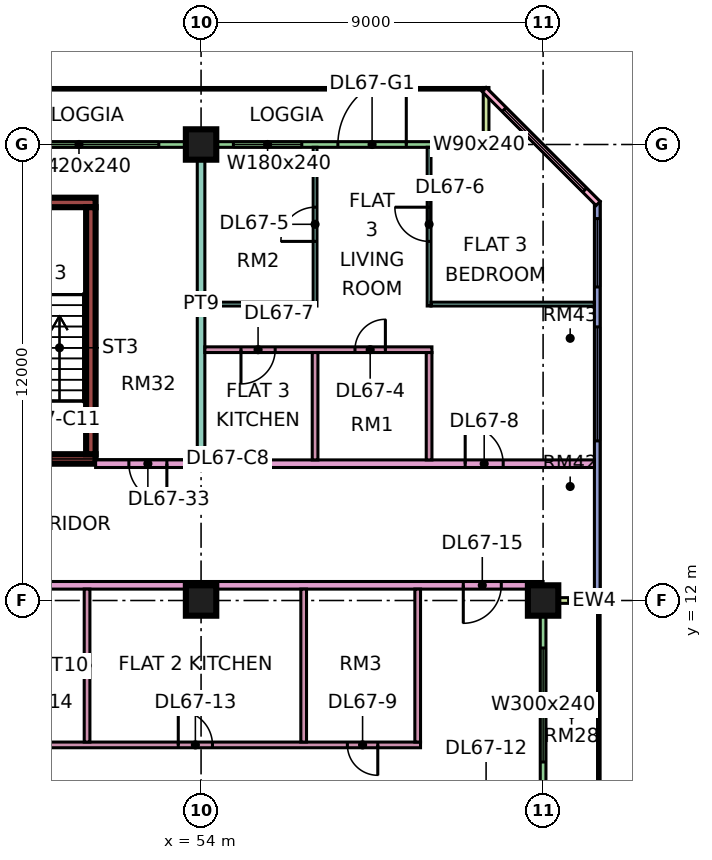
"""IFC4 building model, lengths in metres.
Left out: names, types, materials, properties, quantities, classifications, styles, units other than length and angle.
Written with IfcOpenShell. Run it as: python <this file> out.ifc"""

import sys

from ifc_helpers import new_model, si_unit, direction, frame, frame_2d, origin, origin_2d, place, context, subcontext, project, spatial, rectangle, extrude, element, fill, save


model = new_model("IFC4")
c1 = context("Model", 3, precision=1e-05, world=origin(), true_north=direction((0.0, 1.0)))
c2 = subcontext(c1, "Body", "Model", "MODEL_VIEW")
j1 = project(units=[si_unit("LENGTHUNIT", "METRE"), si_unit("PLANEANGLEUNIT", "RADIAN")], contexts=[c1])
p1 = place(None, origin())
s1 = spatial("IfcSite", under=j1, at=p1, CompositionType="ELEMENT")
p2 = place(p1, origin())
s2 = spatial("IfcBuilding", under=s1, at=p2, CompositionType="ELEMENT")
p3 = place(p2, frame((0.0, 0.0, 288.4)))
s3 = spatial("IfcBuildingStorey", under=s2, at=p3, CompositionType="ELEMENT", Elevation=288.4)
for number, where, z_axis, x_axis in (
    (1, (54.0, 12.0, 0.0), (0.0, 0.0, 1.0), (1.0, 0.0, 0.0)),
    (2, (54.0, 24.0, 0.0), (0.0, 0.0, 1.0), (1.0, 0.0, 0.0)),
    (3, (63.0, 12.0, 0.0), (0.0, 0.0, 1.0), (1.0, 0.0, 0.0)),
):
    element("IfcColumn", number, at=place(p3, frame(where, z_axis=z_axis, x_axis=x_axis)), inside=s3, PredefinedType="COLUMN", context=c2, shape_type="SweptSolid", body=[
        extrude(rectangle(XDim=0.8, YDim=0.8, at=origin_2d()), origin(), (0.0, 0.0, 1.0), 3.75),
    ])
p4 = place(p3, frame((47.775, 15.725, 0.0), z_axis=(0.0, 0.0, 1.0), x_axis=(1.0, 0.0, 0.0)))
e4 = element("IfcWall", 4, at=p4, inside=s3, PredefinedType="SHEAR", context=c2, shape_type="SweptSolid", body=[
    extrude(rectangle(XDim=3.45, YDim=0.25, at=frame_2d((1.725, 0.0))), origin(), (0.0, 0.0, 1.0), 3.75),
])
p5 = place(p4, frame((1.175, 0.0, 0.0)))
e5 = element("IfcOpeningElement", 5, at=p5, cuts=e4, PredefinedType="OPENING", context=c2, shape_type="SweptSolid", body=[
    extrude(rectangle(XDim=1.1, YDim=2.2, at=frame_2d((0.55, 1.1))), frame((0.0, 0.135, 0.0), z_axis=(0.0, -1.0, 0.0), x_axis=(1.0, 0.0, 0.0)), (0.0, 0.0, 1.0), 0.27),
])
p6 = place(p3, frame((47.775, 22.475, 0.0), z_axis=(0.0, 0.0, 1.0), x_axis=(1.0, 0.0, 0.0)))
e6 = element("IfcWall", 6, at=p6, inside=s3, PredefinedType="SHEAR", context=c2, shape_type="SweptSolid", body=[
    extrude(rectangle(XDim=3.45, YDim=0.25, at=frame_2d((1.725, 0.0))), origin(), (0.0, 0.0, 1.0), 3.75),
])
p7 = place(p3, frame((51.1, 15.85, 0.0), z_axis=(0.0, 0.0, 1.0), x_axis=(0.0, 1.0, 0.0)))
e7 = element("IfcWall", 7, at=p7, inside=s3, PredefinedType="SHEAR", context=c2, shape_type="SweptSolid", body=[
    extrude(rectangle(XDim=6.5, YDim=0.25, at=frame_2d((3.25, 0.0))), origin(), (0.0, 0.0, 1.0), 3.75),
])
p8 = place(p3, frame((61.425, 24.0, 0.0), z_axis=(0.0, 0.0, 1.0), x_axis=(-1.0, 0.0, 0.0)))
e8 = element("IfcWall", 8, at=p8, inside=s3, PredefinedType="SOLIDWALL", context=c2, shape_type="SweptSolid", body=[
    extrude(rectangle(XDim=13.35, YDim=0.15, at=frame_2d((6.675, 0.0))), origin(), (0.0, 0.0, 1.0), 3.35),
])
p9 = place(p8, frame((0.262, 0.0, 0.45)))
e9 = element("IfcOpeningElement", 9, at=p9, cuts=e8, PredefinedType="OPENING", context=c2, shape_type="SweptSolid", body=[
    extrude(rectangle(XDim=0.9, YDim=2.4, at=frame_2d((0.45, 1.2))), frame((0.0, 0.085, 0.0), z_axis=(0.0, -1.0, 0.0), x_axis=(1.0, 0.0, 0.0)), (0.0, 0.0, 1.0), 0.17),
])
p10 = place(p8, frame((2.025, 0.0, 0.0)))
e10 = element("IfcOpeningElement", 10, at=p10, cuts=e8, PredefinedType="OPENING", context=c2, shape_type="SweptSolid", body=[
    extrude(rectangle(XDim=1.8, YDim=2.4, at=frame_2d((0.9, 1.2))), frame((0.0, 0.085, 0.0), z_axis=(0.0, -1.0, 0.0), x_axis=(1.0, 0.0, 0.0)), (0.0, 0.0, 1.0), 0.17),
])
p11 = place(p8, frame((4.775, 0.0, 0.45)))
e11 = element("IfcOpeningElement", 11, at=p11, cuts=e8, PredefinedType="OPENING", context=c2, shape_type="SweptSolid", body=[
    extrude(rectangle(XDim=1.8, YDim=2.4, at=frame_2d((0.9, 1.2))), frame((0.0, 0.085, 0.0), z_axis=(0.0, -1.0, 0.0), x_axis=(1.0, 0.0, 0.0)), (0.0, 0.0, 1.0), 0.17),
])
p12 = place(p8, frame((8.538, 0.0, 0.45)))
e12 = element("IfcOpeningElement", 12, at=p12, cuts=e8, PredefinedType="OPENING", context=c2, shape_type="SweptSolid", body=[
    extrude(rectangle(XDim=4.2, YDim=2.4, at=frame_2d((2.1, 1.2))), frame((0.0, 0.085, 0.0), z_axis=(0.0, -1.0, 0.0), x_axis=(1.0, 0.0, 0.0)), (0.0, 0.0, 1.0), 0.17),
])
p13 = place(p3, frame((61.5, 25.5, 0.0), z_axis=(0.0, 0.0, 1.0), x_axis=(0.0, -1.0, 0.0)))
e13 = element("IfcWall", 13, at=p13, inside=s3, PredefinedType="SOLIDWALL", context=c2, shape_type="SweptSolid", body=[
    extrude(rectangle(XDim=1.5, YDim=0.15, at=frame_2d((0.75, 0.0))), origin(), (0.0, 0.0, 1.0), 3.35),
])
p14 = place(p3, frame((63.0, 1.575, 0.0), z_axis=(0.0, 0.0, 1.0), x_axis=(0.0, 1.0, 0.0)))
e14 = element("IfcWall", 14, at=p14, inside=s3, PredefinedType="SOLIDWALL", context=c2, shape_type="SweptSolid", body=[
    extrude(rectangle(XDim=10.35, YDim=0.15, at=frame_2d((5.175, 0.0))), origin(), (0.0, 0.0, 1.0), 3.35),
])
p15 = place(p14, frame((1.812, 0.0, 0.0)))
e15 = element("IfcOpeningElement", 15, at=p15, cuts=e14, PredefinedType="OPENING", context=c2, shape_type="SweptSolid", body=[
    extrude(rectangle(XDim=1.8, YDim=2.4, at=frame_2d((0.9, 1.2))), frame((0.0, 0.085, 0.0), z_axis=(0.0, -1.0, 0.0), x_axis=(1.0, 0.0, 0.0)), (0.0, 0.0, 1.0), 0.17),
])
p16 = place(p14, frame((6.175, 0.0, 0.45)))
e16 = element("IfcOpeningElement", 16, at=p16, cuts=e14, PredefinedType="OPENING", context=c2, shape_type="SweptSolid", body=[
    extrude(rectangle(XDim=3.0, YDim=2.4, at=frame_2d((1.5, 1.2))), frame((0.0, 0.085, 0.0), z_axis=(0.0, -1.0, 0.0), x_axis=(1.0, 0.0, 0.0)), (0.0, 0.0, 1.0), 0.17),
])
p17 = place(p3, frame((64.5, 12.0, 0.0), z_axis=(0.0, 0.0, 1.0), x_axis=(-1.0, 0.0, 0.0)))
e17 = element("IfcWall", 17, at=p17, inside=s3, PredefinedType="SOLIDWALL", context=c2, shape_type="SweptSolid", body=[
    extrude(rectangle(XDim=1.5, YDim=0.15, at=frame_2d((0.75, 0.0))), origin(), (0.0, 0.0, 1.0), 3.35),
])
p18 = place(p3, frame((64.425, 12.075, 0.0), z_axis=(0.0, 0.0, 1.0), x_axis=(0.0, 1.0, 0.0)))
e18 = element("IfcWall", 18, at=p18, inside=s3, PredefinedType="SOLIDWALL", context=c2, shape_type="SweptSolid", body=[
    extrude(rectangle(XDim=10.425, YDim=0.15, at=frame_2d((5.212, 0.0))), origin(), (0.0, 0.0, 1.0), 3.35),
])
p19 = place(p18, frame((4.125, 0.0, 0.45)))
e19 = element("IfcOpeningElement", 19, at=p19, cuts=e18, PredefinedType="OPENING", context=c2, shape_type="SweptSolid", body=[
    extrude(rectangle(XDim=3.0, YDim=2.4, at=frame_2d((1.5, 1.2))), frame((0.0, 0.085, 0.0), z_axis=(0.0, -1.0, 0.0), x_axis=(1.0, 0.0, 0.0)), (0.0, 0.0, 1.0), 0.17),
])
p20 = place(p18, frame((8.175, 0.0, 0.45)))
e20 = element("IfcOpeningElement", 20, at=p20, cuts=e18, PredefinedType="OPENING", context=c2, shape_type="SweptSolid", body=[
    extrude(rectangle(XDim=1.8, YDim=2.4, at=frame_2d((0.9, 1.2))), frame((0.0, 0.085, 0.0), z_axis=(0.0, -1.0, 0.0), x_axis=(1.0, 0.0, 0.0)), (0.0, 0.0, 1.0), 0.17),
])
p21 = place(p3, frame((64.447, 22.447, 0.0), z_axis=(0.0, 0.0, 1.0), x_axis=(-0.707106781187, 0.707106781187, 0.0)))
e21 = element("IfcWall", 21, at=p21, inside=s3, PredefinedType="SOLIDWALL", context=c2, shape_type="SweptSolid", body=[
    extrude(rectangle(XDim=4.243, YDim=0.15, at=frame_2d((2.121, 0.0))), origin(), (0.0, 0.0, 1.0), 3.35),
])
p22 = place(p21, frame((0.498, 0.0, 0.45)))
e22 = element("IfcOpeningElement", 22, at=p22, cuts=e21, PredefinedType="OPENING", context=c2, shape_type="SweptSolid", body=[
    extrude(rectangle(XDim=3.0, YDim=2.4, at=frame_2d((1.5, 1.2))), frame((0.0, 0.085, 0.0), z_axis=(0.0, -1.0, 0.0), x_axis=(1.0, 0.0, 0.0)), (0.0, 0.0, 1.0), 0.17),
])
p23 = place(p3, frame((40.65, 12.4, 0.0), z_axis=(0.0, 0.0, 1.0), x_axis=(1.0, 0.0, 0.0)))
e23 = element("IfcWall", 23, at=p23, inside=s3, PredefinedType="PARTITIONING", context=c2, shape_type="SweptSolid", body=[
    extrude(rectangle(XDim=22.35, YDim=0.2, at=frame_2d((11.175, 0.0))), origin(), (0.0, 0.0, 1.0), 3.35),
])
p24 = place(p23, frame((20.25, 0.0, 0.0)))
e24 = element("IfcOpeningElement", 24, at=p24, cuts=e23, PredefinedType="OPENING", context=c2, shape_type="SweptSolid", body=[
    extrude(rectangle(XDim=1.0, YDim=2.1, at=frame_2d((0.5, 1.05))), frame((0.0, 0.11, 0.0), z_axis=(0.0, -1.0, 0.0), x_axis=(1.0, 0.0, 0.0)), (0.0, 0.0, 1.0), 0.22),
])
p25 = place(p23, frame((1.05, 0.0, 0.0)))
e25 = element("IfcOpeningElement", 25, at=p25, cuts=e23, PredefinedType="OPENING", context=c2, shape_type="SweptSolid", body=[
    extrude(rectangle(XDim=1.0, YDim=2.1, at=frame_2d((0.5, 1.05))), frame((0.0, 0.11, 0.0), z_axis=(0.0, -1.0, 0.0), x_axis=(1.0, 0.0, 0.0)), (0.0, 0.0, 1.0), 0.22),
])
p26 = place(p3, frame((48.1, 8.2, 0.0), z_axis=(0.0, 0.0, 1.0), x_axis=(1.0, 0.0, 0.0)))
e26 = element("IfcWall", 26, at=p26, inside=s3, PredefinedType="PARTITIONING", context=c2, shape_type="SweptSolid", body=[
    extrude(rectangle(XDim=11.675, YDim=0.15, at=frame_2d((5.837, 0.0))), origin(), (0.0, 0.0, 1.0), 3.35),
])
p27 = place(p26, frame((9.75, 0.0, 0.0)))
e27 = element("IfcOpeningElement", 27, at=p27, cuts=e26, PredefinedType="OPENING", context=c2, shape_type="SweptSolid", body=[
    extrude(rectangle(XDim=0.8, YDim=2.1, at=frame_2d((0.4, 1.05))), frame((0.0, 0.085, 0.0), z_axis=(0.0, -1.0, 0.0), x_axis=(1.0, 0.0, 0.0)), (0.0, 0.0, 1.0), 0.17),
])
p28 = place(p26, frame((5.3, 0.0, 0.0)))
e28 = element("IfcOpeningElement", 28, at=p28, cuts=e26, PredefinedType="OPENING", context=c2, shape_type="SweptSolid", body=[
    extrude(rectangle(XDim=0.9, YDim=2.1, at=frame_2d((0.45, 1.05))), frame((0.0, 0.085, 0.0), z_axis=(0.0, -1.0, 0.0), x_axis=(1.0, 0.0, 0.0)), (0.0, 0.0, 1.0), 0.17),
])
p29 = place(p26, frame((1.05, 0.0, 0.0)))
e29 = element("IfcOpeningElement", 29, at=p29, cuts=e26, PredefinedType="OPENING", context=c2, shape_type="SweptSolid", body=[
    extrude(rectangle(XDim=0.8, YDim=2.1, at=frame_2d((0.4, 1.05))), frame((0.0, 0.085, 0.0), z_axis=(0.0, -1.0, 0.0), x_axis=(1.0, 0.0, 0.0)), (0.0, 0.0, 1.0), 0.17),
])
p30 = place(p3, frame((51.0, 8.275, 0.0), z_axis=(0.0, 0.0, 1.0), x_axis=(0.0, 1.0, 0.0)))
e30 = element("IfcWall", 30, at=p30, inside=s3, PredefinedType="PARTITIONING", context=c2, shape_type="SweptSolid", body=[
    extrude(rectangle(XDim=4.025, YDim=0.15, at=frame_2d((2.013, 0.0))), origin(), (0.0, 0.0, 1.0), 3.35),
])
p31 = place(p3, frame((51.225, 15.6, 0.0), z_axis=(0.0, 0.0, 1.0), x_axis=(1.0, 0.0, 0.0)))
e31 = element("IfcWall", 31, at=p31, inside=s3, PredefinedType="PARTITIONING", context=c2, shape_type="SweptSolid", body=[
    extrude(rectangle(XDim=13.125, YDim=0.2, at=frame_2d((6.562, 0.0))), origin(), (0.0, 0.0, 1.0), 3.35),
])
p32 = place(p31, frame((9.725, 0.0, 0.0)))
e32 = element("IfcOpeningElement", 32, at=p32, cuts=e31, PredefinedType="OPENING", context=c2, shape_type="SweptSolid", body=[
    extrude(rectangle(XDim=1.0, YDim=2.1, at=frame_2d((0.5, 1.05))), frame((0.0, 0.11, 0.0), z_axis=(0.0, -1.0, 0.0), x_axis=(1.0, 0.0, 0.0)), (0.0, 0.0, 1.0), 0.22),
])
p33 = place(p31, frame((0.875, 0.0, 0.0)))
e33 = element("IfcOpeningElement", 33, at=p33, cuts=e31, PredefinedType="OPENING", context=c2, shape_type="SweptSolid", body=[
    extrude(rectangle(XDim=1.0, YDim=2.1, at=frame_2d((0.5, 1.05))), frame((0.0, 0.11, 0.0), z_axis=(0.0, -1.0, 0.0), x_axis=(1.0, 0.0, 0.0)), (0.0, 0.0, 1.0), 0.22),
])
p34 = place(p3, frame((54.0, 15.7, 0.0), z_axis=(0.0, 0.0, 1.0), x_axis=(0.0, 1.0, 0.0)))
e34 = element("IfcWall", 34, at=p34, inside=s3, PredefinedType="PARTITIONING", context=c2, shape_type="SweptSolid", body=[
    extrude(rectangle(XDim=8.226, YDim=0.2, at=frame_2d((4.113, 0.0))), origin(), (0.0, 0.0, 1.0), 3.35),
])
p35 = place(p3, frame((54.1, 18.6, 0.0), z_axis=(0.0, 0.0, 1.0), x_axis=(1.0, 0.0, 0.0)))
e35 = element("IfcWall", 35, at=p35, inside=s3, PredefinedType="PARTITIONING", context=c2, shape_type="SweptSolid", body=[
    extrude(rectangle(XDim=5.975, YDim=0.15, at=frame_2d((2.987, 0.0))), origin(), (0.0, 0.0, 1.0), 3.35),
])
p36 = place(p35, frame((3.95, 0.0, 0.0)))
e36 = element("IfcOpeningElement", 36, at=p36, cuts=e35, PredefinedType="OPENING", context=c2, shape_type="SweptSolid", body=[
    extrude(rectangle(XDim=0.8, YDim=2.1, at=frame_2d((0.4, 1.05))), frame((0.0, 0.085, 0.0), z_axis=(0.0, -1.0, 0.0), x_axis=(1.0, 0.0, 0.0)), (0.0, 0.0, 1.0), 0.17),
])
p37 = place(p35, frame((0.95, 0.0, 0.0)))
e37 = element("IfcOpeningElement", 37, at=p37, cuts=e35, PredefinedType="OPENING", context=c2, shape_type="SweptSolid", body=[
    extrude(rectangle(XDim=0.9, YDim=2.1, at=frame_2d((0.45, 1.05))), frame((0.0, 0.085, 0.0), z_axis=(0.0, -1.0, 0.0), x_axis=(1.0, 0.0, 0.0)), (0.0, 0.0, 1.0), 0.17),
])
p38 = place(p3, frame((54.1, 19.8, 0.0), z_axis=(0.0, 0.0, 1.0), x_axis=(1.0, 0.0, 0.0)))
e38 = element("IfcWall", 38, at=p38, inside=s3, PredefinedType="PARTITIONING", context=c2, shape_type="SweptSolid", body=[
    extrude(rectangle(XDim=2.85, YDim=0.1, at=frame_2d((1.425, 0.0))), origin(), (0.0, 0.0, 1.0), 3.35),
])
p39 = place(p3, frame((56.7, 8.275, 0.0), z_axis=(0.0, 0.0, 1.0), x_axis=(0.0, 1.0, 0.0)))
e39 = element("IfcWall", 39, at=p39, inside=s3, PredefinedType="PARTITIONING", context=c2, shape_type="SweptSolid", body=[
    extrude(rectangle(XDim=4.025, YDim=0.15, at=frame_2d((2.013, 0.0))), origin(), (0.0, 0.0, 1.0), 3.35),
])
p40 = place(p3, frame((57.0, 15.7, 0.0), z_axis=(0.0, 0.0, 1.0), x_axis=(0.0, 1.0, 0.0)))
e40 = element("IfcWall", 40, at=p40, inside=s3, PredefinedType="PARTITIONING", context=c2, shape_type="SweptSolid", body=[
    extrude(rectangle(XDim=2.825, YDim=0.15, at=frame_2d((1.413, 0.0))), origin(), (0.0, 0.0, 1.0), 3.35),
])
p41 = place(p3, frame((57.0, 19.75, 0.0), z_axis=(0.0, 0.0, 1.0), x_axis=(0.0, 1.0, 0.0)))
e41 = element("IfcWall", 41, at=p41, inside=s3, PredefinedType="PARTITIONING", context=c2, shape_type="SweptSolid", body=[
    extrude(rectangle(XDim=4.176, YDim=0.1, at=frame_2d((2.088, 0.0))), origin(), (0.0, 0.0, 1.0), 3.35),
])
p42 = place(p41, frame((1.7, 0.0, 0.0)))
e42 = element("IfcOpeningElement", 42, at=p42, cuts=e41, PredefinedType="OPENING", context=c2, shape_type="SweptSolid", body=[
    extrude(rectangle(XDim=0.9, YDim=2.1, at=frame_2d((0.45, 1.05))), frame((0.0, 0.06, 0.0), z_axis=(0.0, -1.0, 0.0), x_axis=(1.0, 0.0, 0.0)), (0.0, 0.0, 1.0), 0.12),
])
p43 = place(p3, frame((59.7, 8.275, 0.0), z_axis=(0.0, 0.0, 1.0), x_axis=(0.0, 1.0, 0.0)))
e43 = element("IfcWall", 43, at=p43, inside=s3, PredefinedType="PARTITIONING", context=c2, shape_type="SweptSolid", body=[
    extrude(rectangle(XDim=4.025, YDim=0.15, at=frame_2d((2.013, 0.0))), origin(), (0.0, 0.0, 1.0), 3.35),
])
p44 = place(p3, frame((60.0, 15.7, 0.0), z_axis=(0.0, 0.0, 1.0), x_axis=(0.0, 1.0, 0.0)))
e44 = element("IfcWall", 44, at=p44, inside=s3, PredefinedType="PARTITIONING", context=c2, shape_type="SweptSolid", body=[
    extrude(rectangle(XDim=2.825, YDim=0.15, at=frame_2d((1.413, 0.0))), origin(), (0.0, 0.0, 1.0), 3.35),
])
p45 = place(p3, frame((60.0, 19.75, 0.0), z_axis=(0.0, 0.0, 1.0), x_axis=(0.0, 1.0, 0.0)))
e45 = element("IfcWall", 45, at=p45, inside=s3, PredefinedType="PARTITIONING", context=c2, shape_type="SweptSolid", body=[
    extrude(rectangle(XDim=4.176, YDim=0.1, at=frame_2d((2.088, 0.0))), origin(), (0.0, 0.0, 1.0), 3.35),
])
p46 = place(p45, frame((1.7, 0.0, 0.0)))
e46 = element("IfcOpeningElement", 46, at=p46, cuts=e45, PredefinedType="OPENING", context=c2, shape_type="SweptSolid", body=[
    extrude(rectangle(XDim=0.9, YDim=2.1, at=frame_2d((0.45, 1.05))), frame((0.0, 0.06, 0.0), z_axis=(0.0, -1.0, 0.0), x_axis=(1.0, 0.0, 0.0)), (0.0, 0.0, 1.0), 0.12),
])
p47 = place(p3, frame((60.05, 19.8, 0.0), z_axis=(0.0, 0.0, 1.0), x_axis=(1.0, 0.0, 0.0)))
e47 = element("IfcWall", 47, at=p47, inside=s3, PredefinedType="PARTITIONING", context=c2, shape_type="SweptSolid", body=[
    extrude(rectangle(XDim=4.3, YDim=0.1, at=frame_2d((2.15, 0.0))), origin(), (0.0, 0.0, 1.0), 3.35),
])
p48 = place(p9, origin())
e48 = element("IfcWindow", 48, at=p48, inside=s3, PartitioningType="SINGLE_PANEL", PredefinedType="WINDOW", context=c2, shape_type="SweptSolid", body=[
    extrude(rectangle(XDim=0.9, YDim=2.4, at=frame_2d((0.45, 1.2))), frame((0.0, 0.03, 0.0), z_axis=(0.0, -1.0, 0.0), x_axis=(1.0, 0.0, 0.0)), (0.0, 0.0, 1.0), 0.06),
])
fill(e9, e48)
p49 = place(p10, frame((1.8, 0.0, 0.0), z_axis=(0.0, 0.0, 1.0), x_axis=(-1.0, 0.0, 0.0)))
e49 = element("IfcDoor", 49, at=p49, inside=s3, OperationType="DOUBLE_DOOR_SINGLE_SWING", PredefinedType="DOOR", context=c2, shape_type="SweptSolid", body=[
    extrude(rectangle(XDim=1.8, YDim=2.4, at=frame_2d((0.9, 1.2))), frame((0.0, 0.025, 0.0), z_axis=(0.0, -1.0, 0.0), x_axis=(1.0, 0.0, 0.0)), (0.0, 0.0, 1.0), 0.05),
])
fill(e10, e49)
p50 = place(p11, origin())
e50 = element("IfcWindow", 50, at=p50, inside=s3, PartitioningType="SINGLE_PANEL", PredefinedType="WINDOW", context=c2, shape_type="SweptSolid", body=[
    extrude(rectangle(XDim=1.8, YDim=2.4, at=frame_2d((0.9, 1.2))), frame((0.0, 0.03, 0.0), z_axis=(0.0, -1.0, 0.0), x_axis=(1.0, 0.0, 0.0)), (0.0, 0.0, 1.0), 0.06),
])
fill(e11, e50)
p51 = place(p12, origin())
e51 = element("IfcWindow", 51, at=p51, inside=s3, PartitioningType="SINGLE_PANEL", PredefinedType="WINDOW", context=c2, shape_type="SweptSolid", body=[
    extrude(rectangle(XDim=4.2, YDim=2.4, at=frame_2d((2.1, 1.2))), frame((0.0, 0.03, 0.0), z_axis=(0.0, -1.0, 0.0), x_axis=(1.0, 0.0, 0.0)), (0.0, 0.0, 1.0), 0.06),
])
fill(e12, e51)
p52 = place(p16, origin())
e52 = element("IfcWindow", 52, at=p52, inside=s3, PartitioningType="SINGLE_PANEL", PredefinedType="WINDOW", context=c2, shape_type="SweptSolid", body=[
    extrude(rectangle(XDim=3.0, YDim=2.4, at=frame_2d((1.5, 1.2))), frame((0.0, 0.03, 0.0), z_axis=(0.0, -1.0, 0.0), x_axis=(1.0, 0.0, 0.0)), (0.0, 0.0, 1.0), 0.06),
])
fill(e16, e52)
p53 = place(p19, origin())
e53 = element("IfcWindow", 53, at=p53, inside=s3, PartitioningType="SINGLE_PANEL", PredefinedType="WINDOW", context=c2, shape_type="SweptSolid", body=[
    extrude(rectangle(XDim=3.0, YDim=2.4, at=frame_2d((1.5, 1.2))), frame((0.0, 0.03, 0.0), z_axis=(0.0, -1.0, 0.0), x_axis=(1.0, 0.0, 0.0)), (0.0, 0.0, 1.0), 0.06),
])
fill(e19, e53)
p54 = place(p20, origin())
e54 = element("IfcWindow", 54, at=p54, inside=s3, PartitioningType="SINGLE_PANEL", PredefinedType="WINDOW", context=c2, shape_type="SweptSolid", body=[
    extrude(rectangle(XDim=1.8, YDim=2.4, at=frame_2d((0.9, 1.2))), frame((0.0, 0.03, 0.0), z_axis=(0.0, -1.0, 0.0), x_axis=(1.0, 0.0, 0.0)), (0.0, 0.0, 1.0), 0.06),
])
fill(e20, e54)
p55 = place(p22, origin())
e55 = element("IfcWindow", 55, at=p55, inside=s3, PartitioningType="SINGLE_PANEL", PredefinedType="WINDOW", context=c2, shape_type="SweptSolid", body=[
    extrude(rectangle(XDim=3.0, YDim=2.4, at=frame_2d((1.5, 1.2))), frame((0.0, 0.03, 0.0), z_axis=(0.0, -1.0, 0.0), x_axis=(1.0, 0.0, 0.0)), (0.0, 0.0, 1.0), 0.06),
])
fill(e22, e55)
p56 = place(p36, frame((0.8, 0.0, 0.0), z_axis=(0.0, 0.0, 1.0), x_axis=(-1.0, 0.0, 0.0)))
e56 = element("IfcDoor", 56, at=p56, inside=s3, OperationType="SINGLE_SWING_RIGHT", PredefinedType="DOOR", context=c2, shape_type="SweptSolid", body=[
    extrude(rectangle(XDim=0.8, YDim=2.1, at=frame_2d((0.4, 1.05))), frame((0.0, 0.025, 0.0), z_axis=(0.0, -1.0, 0.0), x_axis=(1.0, 0.0, 0.0)), (0.0, 0.0, 1.0), 0.05),
])
fill(e36, e56)
p57 = place(p42, origin())
e57 = element("IfcDoor", 57, at=p57, inside=s3, OperationType="SINGLE_SWING_LEFT", PredefinedType="DOOR", context=c2, shape_type="SweptSolid", body=[
    extrude(rectangle(XDim=0.9, YDim=2.1, at=frame_2d((0.45, 1.05))), frame((0.0, 0.025, 0.0), z_axis=(0.0, -1.0, 0.0), x_axis=(1.0, 0.0, 0.0)), (0.0, 0.0, 1.0), 0.05),
])
fill(e42, e57)
p58 = place(p46, frame((0.9, 0.0, 0.0), z_axis=(0.0, 0.0, 1.0), x_axis=(-1.0, 0.0, 0.0)))
e58 = element("IfcDoor", 58, at=p58, inside=s3, OperationType="SINGLE_SWING_RIGHT", PredefinedType="DOOR", context=c2, shape_type="SweptSolid", body=[
    extrude(rectangle(XDim=0.9, YDim=2.1, at=frame_2d((0.45, 1.05))), frame((0.0, 0.025, 0.0), z_axis=(0.0, -1.0, 0.0), x_axis=(1.0, 0.0, 0.0)), (0.0, 0.0, 1.0), 0.05),
])
fill(e46, e58)
p59 = place(p37, frame((0.9, 0.0, 0.0), z_axis=(0.0, 0.0, 1.0), x_axis=(-1.0, 0.0, 0.0)))
e59 = element("IfcDoor", 59, at=p59, inside=s3, OperationType="SINGLE_SWING_LEFT", PredefinedType="DOOR", context=c2, shape_type="SweptSolid", body=[
    extrude(rectangle(XDim=0.9, YDim=2.1, at=frame_2d((0.45, 1.05))), frame((0.0, 0.025, 0.0), z_axis=(0.0, -1.0, 0.0), x_axis=(1.0, 0.0, 0.0)), (0.0, 0.0, 1.0), 0.05),
])
fill(e37, e59)
p60 = place(p32, origin())
e60 = element("IfcDoor", 60, at=p60, inside=s3, OperationType="SINGLE_SWING_LEFT", PredefinedType="DOOR", context=c2, shape_type="SweptSolid", body=[
    extrude(rectangle(XDim=1.0, YDim=2.1, at=frame_2d((0.5, 1.05))), frame((0.0, 0.025, 0.0), z_axis=(0.0, -1.0, 0.0), x_axis=(1.0, 0.0, 0.0)), (0.0, 0.0, 1.0), 0.05),
])
fill(e32, e60)
p61 = place(p27, origin())
e61 = element("IfcDoor", 61, at=p61, inside=s3, OperationType="SINGLE_SWING_RIGHT", PredefinedType="DOOR", context=c2, shape_type="SweptSolid", body=[
    extrude(rectangle(XDim=0.8, YDim=2.1, at=frame_2d((0.4, 1.05))), frame((0.0, 0.025, 0.0), z_axis=(0.0, -1.0, 0.0), x_axis=(1.0, 0.0, 0.0)), (0.0, 0.0, 1.0), 0.05),
])
fill(e27, e61)
p62 = place(p28, origin())
e62 = element("IfcDoor", 62, at=p62, inside=s3, OperationType="SINGLE_SWING_LEFT", PredefinedType="DOOR", context=c2, shape_type="SweptSolid", body=[
    extrude(rectangle(XDim=0.9, YDim=2.1, at=frame_2d((0.45, 1.05))), frame((0.0, 0.025, 0.0), z_axis=(0.0, -1.0, 0.0), x_axis=(1.0, 0.0, 0.0)), (0.0, 0.0, 1.0), 0.05),
])
fill(e28, e62)
p63 = place(p24, frame((1.0, 0.0, 0.0), z_axis=(0.0, 0.0, 1.0), x_axis=(-1.0, 0.0, 0.0)))
e63 = element("IfcDoor", 63, at=p63, inside=s3, OperationType="SINGLE_SWING_LEFT", PredefinedType="DOOR", context=c2, shape_type="SweptSolid", body=[
    extrude(rectangle(XDim=1.0, YDim=2.1, at=frame_2d((0.5, 1.05))), frame((0.0, 0.025, 0.0), z_axis=(0.0, -1.0, 0.0), x_axis=(1.0, 0.0, 0.0)), (0.0, 0.0, 1.0), 0.05),
])
fill(e24, e63)
p64 = place(p33, origin())
e64 = element("IfcDoor", 64, at=p64, inside=s3, OperationType="SINGLE_SWING_RIGHT", PredefinedType="DOOR", context=c2, shape_type="SweptSolid", body=[
    extrude(rectangle(XDim=1.0, YDim=2.1, at=frame_2d((0.5, 1.05))), frame((0.0, 0.025, 0.0), z_axis=(0.0, -1.0, 0.0), x_axis=(1.0, 0.0, 0.0)), (0.0, 0.0, 1.0), 0.05),
])
fill(e33, e64)
save(model, sys.argv[1])
